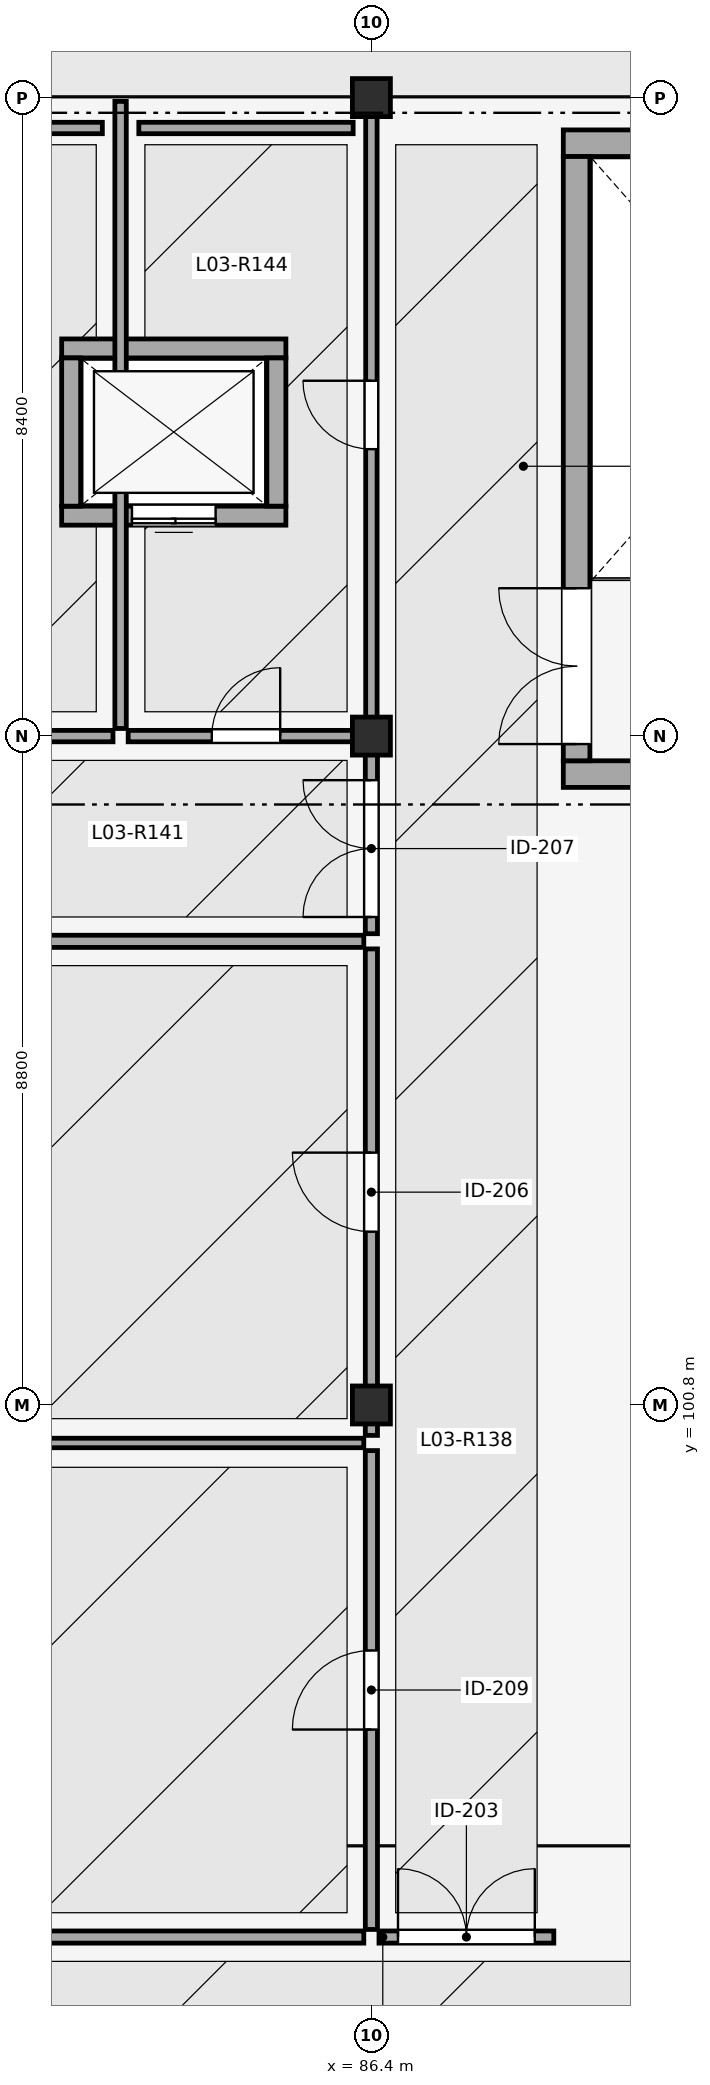
"""IFC4 building model, lengths in metres.
Left out: names, types, materials, properties, quantities, classifications, styles, units other than length and angle.
Written with IfcOpenShell. Run it as: python <this file> out.ifc"""

import sys

from ifc_helpers import new_model, si_unit, direction, frame, frame_2d, origin, origin_2d, place, context, subcontext, project, spatial, rectangle, extrude, element, fill, save


model = new_model("IFC4")
c1 = context("Model", 3, precision=1e-05, world=origin(), true_north=direction((0.0, 1.0)))
c2 = subcontext(c1, "Body", "Model", "MODEL_VIEW")
j1 = project(units=[si_unit("LENGTHUNIT", "METRE"), si_unit("PLANEANGLEUNIT", "RADIAN")], contexts=[c1])
p1 = place(None, origin())
s1 = spatial("IfcSite", under=j1, at=p1, CompositionType="ELEMENT")
p2 = place(p1, origin())
s2 = spatial("IfcBuilding", under=s1, at=p2, CompositionType="ELEMENT")
p3 = place(p2, frame((0.0, 0.0, 14.1)))
s3 = spatial("IfcBuildingStorey", under=s2, at=p3, CompositionType="ELEMENT", Elevation=14.1)
p4 = place(p3, frame((86.4, 100.8, 0.0), z_axis=(0.0, 0.0, 1.0), x_axis=(1.0, 0.0, 0.0)))
e1 = element("IfcColumn", 1, at=p4, inside=s3, PredefinedType="COLUMN", context=c2, shape_type="SweptSolid", body=[
    extrude(rectangle(XDim=0.5, YDim=0.5, at=origin_2d()), origin(), (0.0, 0.0, 1.0), 4.5),
])
p5 = place(p3, frame((86.4, 109.6, 0.0), z_axis=(0.0, 0.0, 1.0), x_axis=(1.0, 0.0, 0.0)))
e2 = element("IfcColumn", 2, at=p5, inside=s3, PredefinedType="COLUMN", context=c2, shape_type="SweptSolid", body=[
    extrude(rectangle(XDim=0.5, YDim=0.5, at=origin_2d()), origin(), (0.0, 0.0, 1.0), 4.326),
])
p6 = place(p3, frame((86.4, 118.0, 0.0), z_axis=(0.0, 0.0, 1.0), x_axis=(1.0, 0.0, 0.0)))
e3 = element("IfcColumn", 3, at=p6, inside=s3, PredefinedType="COLUMN", context=c2, shape_type="SweptSolid", body=[
    extrude(rectangle(XDim=0.5, YDim=0.5, at=origin_2d()), origin(), (0.0, 0.0, 1.0), 3.675),
])
for number, where, z_axis, x_axis in (
    (4, (94.575, 109.1, 0.0), (0.0, 0.0, 1.0), (-1.0, 0.0, 0.0)),
    (5, (88.925, 117.4, 0.0), (0.0, 0.0, 1.0), (1.0, 0.0, 0.0)),
):
    element("IfcWall", number, at=place(p3, frame(where, z_axis=z_axis, x_axis=x_axis)), inside=s3, PredefinedType="SHEAR", context=c2, shape_type="SweptSolid", body=[
        extrude(rectangle(XDim=5.65, YDim=0.35, at=frame_2d((2.825, 0.0))), origin(), (0.0, 0.0, 1.0), 3.65),
    ])
p7 = place(p3, frame((89.1, 109.275, 0.0), z_axis=(0.0, 0.0, 1.0), x_axis=(0.0, 1.0, 0.0)))
e6 = element("IfcWall", 6, at=p7, inside=s3, PredefinedType="SHEAR", context=c2, shape_type="SweptSolid", body=[
    extrude(rectangle(XDim=7.95, YDim=0.35, at=frame_2d((3.975, 0.0))), origin(), (0.0, 0.0, 1.0), 3.65),
])
p8 = place(p7, frame((0.22, 0.0, 0.0)))
e7 = element("IfcOpeningElement", 7, at=p8, cuts=e6, PredefinedType="OPENING", context=c2, shape_type="SweptSolid", body=[
    extrude(rectangle(XDim=2.05, YDim=2.15, at=frame_2d((1.025, 1.075))), frame((0.0, 0.185, 0.0), z_axis=(0.0, -1.0, 0.0), x_axis=(1.0, 0.0, 0.0)), (0.0, 0.0, 1.0), 0.37),
])
p9 = place(p3, frame((85.275, 112.5, 0.0), z_axis=(0.0, 0.0, 1.0), x_axis=(-1.0, 0.0, 0.0)))
e8 = element("IfcWall", 8, at=p9, inside=s3, PredefinedType="SOLIDWALL", context=c2, shape_type="SweptSolid", body=[
    extrude(rectangle(XDim=2.95, YDim=0.25, at=frame_2d((1.475, 0.0))), origin(), (0.0, 0.0, 1.0), 3.65),
])
p10 = place(p9, frame((0.925, 0.0, 0.0)))
e9 = element("IfcOpeningElement", 9, at=p10, cuts=e8, PredefinedType="OPENING", context=c2, shape_type="SweptSolid", body=[
    extrude(rectangle(XDim=1.1, YDim=2.15, at=frame_2d((0.55, 1.075))), frame((0.0, 0.135, 0.0), z_axis=(0.0, -1.0, 0.0), x_axis=(1.0, 0.0, 0.0)), (0.0, 0.0, 1.0), 0.27),
])
p11 = place(p3, frame((82.325, 114.7, 0.0), z_axis=(0.0, 0.0, 1.0), x_axis=(1.0, 0.0, 0.0)))
e10 = element("IfcWall", 10, at=p11, inside=s3, PredefinedType="SOLIDWALL", context=c2, shape_type="SweptSolid", body=[
    extrude(rectangle(XDim=2.95, YDim=0.25, at=frame_2d((1.475, 0.0))), origin(), (0.0, 0.0, 1.0), 3.65),
])
for number, where, z_axis, x_axis in (
    (11, (82.45, 112.625, 0.0), (0.0, 0.0, 1.0), (0.0, 1.0, 0.0)),
    (12, (85.15, 114.575, 0.0), (0.0, 0.0, 1.0), (0.0, -1.0, 0.0)),
):
    element("IfcWall", number, at=place(p3, frame(where, z_axis=z_axis, x_axis=x_axis)), inside=s3, PredefinedType="SOLIDWALL", context=c2, shape_type="SweptSolid", body=[
        extrude(rectangle(XDim=1.95, YDim=0.25, at=frame_2d((0.975, 0.0))), origin(), (0.0, 0.0, 1.0), 3.65),
    ])
p12 = place(p3, frame((86.5, 93.8, 0.0), z_axis=(0.0, 0.0, 1.0), x_axis=(1.0, 0.0, 0.0)))
e13 = element("IfcWall", 13, at=p12, inside=s3, PredefinedType="PARTITIONING", context=c2, shape_type="SweptSolid", body=[
    extrude(rectangle(XDim=2.3, YDim=0.16, at=frame_2d((1.15, 0.0))), origin(), (0.0, 0.0, 1.0), 3.1),
])
p13 = place(p12, frame((0.25, 0.0, 0.0)))
e14 = element("IfcOpeningElement", 14, at=p13, cuts=e13, PredefinedType="OPENING", context=c2, shape_type="SweptSolid", body=[
    extrude(rectangle(XDim=1.8, YDim=2.15, at=frame_2d((0.9, 1.075))), frame((0.0, 0.09, 0.0), z_axis=(0.0, -1.0, 0.0), x_axis=(1.0, 0.0, 0.0)), (0.0, 0.0, 1.0), 0.18),
])
p14 = place(p3, frame((76.9, 93.8, 0.0), z_axis=(0.0, 0.0, 1.0), x_axis=(1.0, 0.0, 0.0)))
e15 = element("IfcWall", 15, at=p14, inside=s3, PredefinedType="PARTITIONING", context=c2, shape_type="SweptSolid", body=[
    extrude(rectangle(XDim=9.4, YDim=0.16, at=frame_2d((4.7, 0.0))), origin(), (0.0, 0.0, 1.0), 3.1),
])
p15 = place(p14, frame((4.18, 0.0, 0.0)))
e16 = element("IfcOpeningElement", 16, at=p15, cuts=e15, PredefinedType="OPENING", context=c2, shape_type="SweptSolid", body=[
    extrude(rectangle(XDim=1.04, YDim=2.18, at=frame_2d((0.52, 1.09))), frame((0.0, 0.09, 0.0), z_axis=(0.0, -1.0, 0.0), x_axis=(1.0, 0.0, 0.0)), (0.0, 0.0, 1.0), 0.18),
])
p16 = place(p3, frame((86.4, 100.4, 0.0), z_axis=(0.0, 0.0, 1.0), x_axis=(0.0, 1.0, 0.0)))
e17 = element("IfcWall", 17, at=p16, inside=s3, PredefinedType="PARTITIONING", context=c2, shape_type="SweptSolid", body=[
    extrude(rectangle(XDim=6.4, YDim=0.16, at=frame_2d((3.2, 0.0))), origin(), (0.0, 0.0, 1.0), 3.1),
])
p17 = place(p16, frame((2.68, 0.0, 0.0)))
e18 = element("IfcOpeningElement", 18, at=p17, cuts=e17, PredefinedType="OPENING", context=c2, shape_type="SweptSolid", body=[
    extrude(rectangle(XDim=1.04, YDim=2.18, at=frame_2d((0.52, 1.09))), frame((0.0, 0.09, 0.0), z_axis=(0.0, -1.0, 0.0), x_axis=(1.0, 0.0, 0.0)), (0.0, 0.0, 1.0), 0.18),
])
p18 = place(p3, frame((86.4, 107.0, 0.0), z_axis=(0.0, 0.0, 1.0), x_axis=(0.0, 1.0, 0.0)))
e19 = element("IfcWall", 19, at=p18, inside=s3, PredefinedType="PARTITIONING", context=c2, shape_type="SweptSolid", body=[
    extrude(rectangle(XDim=2.5, YDim=0.16, at=frame_2d((1.25, 0.0))), origin(), (0.0, 0.0, 1.0), 3.1),
])
p19 = place(p18, frame((0.22, 0.0, 0.0)))
e20 = element("IfcOpeningElement", 20, at=p19, cuts=e19, PredefinedType="OPENING", context=c2, shape_type="SweptSolid", body=[
    extrude(rectangle(XDim=1.8, YDim=2.15, at=frame_2d((0.9, 1.075))), frame((0.0, 0.09, 0.0), z_axis=(0.0, -1.0, 0.0), x_axis=(1.0, 0.0, 0.0)), (0.0, 0.0, 1.0), 0.18),
])
p20 = place(p3, frame((86.4, 109.7, 0.0), z_axis=(0.0, 0.0, 1.0), x_axis=(0.0, 1.0, 0.0)))
e21 = element("IfcWall", 21, at=p20, inside=s3, PredefinedType="PARTITIONING", context=c2, shape_type="SweptSolid", body=[
    extrude(rectangle(XDim=8.25, YDim=0.15, at=frame_2d((4.125, 0.0))), origin(), (0.0, 0.0, 1.0), 2.816),
])
p21 = place(p20, frame((3.675, 0.0, 0.0)))
e22 = element("IfcOpeningElement", 22, at=p21, cuts=e21, PredefinedType="OPENING", context=c2, shape_type="SweptSolid", body=[
    extrude(rectangle(XDim=0.9, YDim=2.15, at=frame_2d((0.45, 1.075))), frame((0.0, 0.085, 0.0), z_axis=(0.0, -1.0, 0.0), x_axis=(1.0, 0.0, 0.0)), (0.0, 0.0, 1.0), 0.17),
])
p22 = place(p3, frame((86.4, 93.9, 0.0), z_axis=(0.0, 0.0, 1.0), x_axis=(0.0, 1.0, 0.0)))
e23 = element("IfcWall", 23, at=p22, inside=s3, PredefinedType="PARTITIONING", context=c2, shape_type="SweptSolid", body=[
    extrude(rectangle(XDim=6.3, YDim=0.16, at=frame_2d((3.15, 0.0))), origin(), (0.0, 0.0, 1.0), 3.1),
])
p23 = place(p22, frame((2.63, 0.0, 0.0)))
e24 = element("IfcOpeningElement", 24, at=p23, cuts=e23, PredefinedType="OPENING", context=c2, shape_type="SweptSolid", body=[
    extrude(rectangle(XDim=1.04, YDim=2.18, at=frame_2d((0.52, 1.09))), frame((0.0, 0.09, 0.0), z_axis=(0.0, -1.0, 0.0), x_axis=(1.0, 0.0, 0.0)), (0.0, 0.0, 1.0), 0.18),
])
p24 = place(p3, frame((76.9, 106.9, 0.0), z_axis=(0.0, 0.0, 1.0), x_axis=(1.0, 0.0, 0.0)))
e25 = element("IfcWall", 25, at=p24, inside=s3, PredefinedType="PARTITIONING", context=c2, shape_type="SweptSolid", body=[
    extrude(rectangle(XDim=9.4, YDim=0.16, at=frame_2d((4.7, 0.0))), origin(), (0.0, 0.0, 1.0), 3.1),
])
p25 = place(p24, frame((4.18, 0.0, 0.0)))
e26 = element("IfcOpeningElement", 26, at=p25, cuts=e25, PredefinedType="OPENING", context=c2, shape_type="SweptSolid", body=[
    extrude(rectangle(XDim=1.04, YDim=2.18, at=frame_2d((0.52, 1.09))), frame((0.0, 0.09, 0.0), z_axis=(0.0, -1.0, 0.0), x_axis=(1.0, 0.0, 0.0)), (0.0, 0.0, 1.0), 0.18),
])
p26 = place(p3, frame((76.9, 100.3, 0.0), z_axis=(0.0, 0.0, 1.0), x_axis=(1.0, 0.0, 0.0)))
e27 = element("IfcWall", 27, at=p26, inside=s3, PredefinedType="PARTITIONING", context=c2, shape_type="SweptSolid", body=[
    extrude(rectangle(XDim=9.4, YDim=0.125, at=frame_2d((4.7, 0.0))), origin(), (0.0, 0.0, 1.0), 3.1),
])
p27 = place(p3, frame((79.8, 109.6, 0.0), z_axis=(0.0, 0.0, 1.0), x_axis=(1.0, 0.0, 0.0)))
e28 = element("IfcWall", 28, at=p27, inside=s3, PredefinedType="PARTITIONING", context=c2, shape_type="SweptSolid", body=[
    extrude(rectangle(XDim=3.2, YDim=0.15, at=frame_2d((1.6, 0.0))), origin(), (0.0, 0.0, 1.0), 3.1),
])
p28 = place(p27, frame((1.15, 0.0, 0.0)))
e29 = element("IfcOpeningElement", 29, at=p28, cuts=e28, PredefinedType="OPENING", context=c2, shape_type="SweptSolid", body=[
    extrude(rectangle(XDim=0.9, YDim=2.15, at=frame_2d((0.45, 1.075))), frame((0.0, 0.085, 0.0), z_axis=(0.0, -1.0, 0.0), x_axis=(1.0, 0.0, 0.0)), (0.0, 0.0, 1.0), 0.17),
])
p29 = place(p3, frame((83.2, 109.6, 0.0), z_axis=(0.0, 0.0, 1.0), x_axis=(1.0, 0.0, 0.0)))
e30 = element("IfcWall", 30, at=p29, inside=s3, PredefinedType="PARTITIONING", context=c2, shape_type="SweptSolid", body=[
    extrude(rectangle(XDim=3.1, YDim=0.15, at=frame_2d((1.55, 0.0))), origin(), (0.0, 0.0, 1.0), 3.1),
])
p30 = place(p29, frame((1.1, 0.0, 0.0)))
e31 = element("IfcOpeningElement", 31, at=p30, cuts=e30, PredefinedType="OPENING", context=c2, shape_type="SweptSolid", body=[
    extrude(rectangle(XDim=0.9, YDim=2.15, at=frame_2d((0.45, 1.075))), frame((0.0, 0.085, 0.0), z_axis=(0.0, -1.0, 0.0), x_axis=(1.0, 0.0, 0.0)), (0.0, 0.0, 1.0), 0.17),
])
p31 = place(p3, frame((83.1, 109.7, 0.0), z_axis=(0.0, 0.0, 1.0), x_axis=(0.0, 1.0, 0.0)))
e32 = element("IfcWall", 32, at=p31, inside=s3, PredefinedType="PARTITIONING", context=c2, shape_type="SweptSolid", body=[
    extrude(rectangle(XDim=8.25, YDim=0.15, at=frame_2d((4.125, 0.0))), origin(), (0.0, 0.0, 1.0), 3.1),
])
p32 = place(p3, frame((79.94, 117.6, 0.0), z_axis=(0.0, 0.0, 1.0), x_axis=(1.0, 0.0, 0.0)))
e33 = element("IfcWall", 33, at=p32, inside=s3, PredefinedType="PARTITIONING", context=c2, shape_type="SweptSolid", body=[
    extrude(rectangle(XDim=2.92, YDim=0.15, at=frame_2d((1.46, 0.0))), origin(), (0.0, 0.0, 1.0), 3.1),
])
p33 = place(p3, frame((83.34, 117.6, 0.0), z_axis=(0.0, 0.0, 1.0), x_axis=(1.0, 0.0, 0.0)))
e34 = element("IfcWall", 34, at=p33, inside=s3, PredefinedType="PARTITIONING", context=c2, shape_type="SweptSolid", body=[
    extrude(rectangle(XDim=2.82, YDim=0.15, at=frame_2d((1.41, 0.0))), origin(), (0.0, 0.0, 1.0), 3.1),
])
p34 = place(p8, origin())
e35 = element("IfcDoor", 35, at=p34, inside=s3, OperationType="DOUBLE_DOOR_SINGLE_SWING", PredefinedType="DOOR", context=c2, shape_type="SweptSolid", body=[
    extrude(rectangle(XDim=2.05, YDim=2.15, at=frame_2d((1.025, 1.075))), frame((0.0, 0.025, 0.0), z_axis=(0.0, -1.0, 0.0), x_axis=(1.0, 0.0, 0.0)), (0.0, 0.0, 1.0), 0.05),
])
fill(e7, e35)
p35 = place(p10, origin())
e36 = element("IfcDoor", 36, at=p35, inside=s3, OperationType="DOUBLE_DOOR_SLIDING", PredefinedType="DOOR", context=c2, shape_type="SweptSolid", body=[
    extrude(rectangle(XDim=1.1, YDim=2.15, at=frame_2d((0.55, 1.075))), frame((0.0, 0.025, 0.0), z_axis=(0.0, -1.0, 0.0), x_axis=(1.0, 0.0, 0.0)), (0.0, 0.0, 1.0), 0.05),
])
fill(e9, e36)
p36 = place(p13, origin())
e37 = element("IfcDoor", 37, at=p36, inside=s3, OperationType="DOUBLE_DOOR_SINGLE_SWING", PredefinedType="DOOR", context=c2, shape_type="SweptSolid", body=[
    extrude(rectangle(XDim=1.8, YDim=2.15, at=frame_2d((0.9, 1.075))), frame((0.0, 0.025, 0.0), z_axis=(0.0, -1.0, 0.0), x_axis=(1.0, 0.0, 0.0)), (0.0, 0.0, 1.0), 0.05),
])
fill(e14, e37)
p37 = place(p17, origin())
e38 = element("IfcDoor", 38, at=p37, inside=s3, OperationType="SINGLE_SWING_RIGHT", PredefinedType="DOOR", context=c2, shape_type="SweptSolid", body=[
    extrude(rectangle(XDim=1.04, YDim=2.18, at=frame_2d((0.52, 1.09))), frame((0.0, 0.025, 0.0), z_axis=(0.0, -1.0, 0.0), x_axis=(1.0, 0.0, 0.0)), (0.0, 0.0, 1.0), 0.05),
])
fill(e18, e38)
p38 = place(p19, origin())
e39 = element("IfcDoor", 39, at=p38, inside=s3, OperationType="DOUBLE_DOOR_SINGLE_SWING", PredefinedType="DOOR", context=c2, shape_type="SweptSolid", body=[
    extrude(rectangle(XDim=1.8, YDim=2.15, at=frame_2d((0.9, 1.075))), frame((0.0, 0.025, 0.0), z_axis=(0.0, -1.0, 0.0), x_axis=(1.0, 0.0, 0.0)), (0.0, 0.0, 1.0), 0.05),
])
fill(e20, e39)
p39 = place(p21, origin())
e40 = element("IfcDoor", 40, at=p39, inside=s3, OperationType="SINGLE_SWING_RIGHT", PredefinedType="DOOR", context=c2, shape_type="SweptSolid", body=[
    extrude(rectangle(XDim=0.9, YDim=2.15, at=frame_2d((0.45, 1.075))), frame((0.0, 0.025, 0.0), z_axis=(0.0, -1.0, 0.0), x_axis=(1.0, 0.0, 0.0)), (0.0, 0.0, 1.0), 0.05),
])
fill(e22, e40)
p40 = place(p23, origin())
e41 = element("IfcDoor", 41, at=p40, inside=s3, OperationType="SINGLE_SWING_LEFT", PredefinedType="DOOR", context=c2, shape_type="SweptSolid", body=[
    extrude(rectangle(XDim=1.04, YDim=2.18, at=frame_2d((0.52, 1.09))), frame((0.0, 0.025, 0.0), z_axis=(0.0, -1.0, 0.0), x_axis=(1.0, 0.0, 0.0)), (0.0, 0.0, 1.0), 0.05),
])
fill(e24, e41)
p41 = place(p30, origin())
e42 = element("IfcDoor", 42, at=p41, inside=s3, OperationType="SINGLE_SWING_RIGHT", PredefinedType="DOOR", context=c2, shape_type="SweptSolid", body=[
    extrude(rectangle(XDim=0.9, YDim=2.15, at=frame_2d((0.45, 1.075))), frame((0.0, 0.025, 0.0), z_axis=(0.0, -1.0, 0.0), x_axis=(1.0, 0.0, 0.0)), (0.0, 0.0, 1.0), 0.05),
])
fill(e31, e42)
save(model, sys.argv[1])
